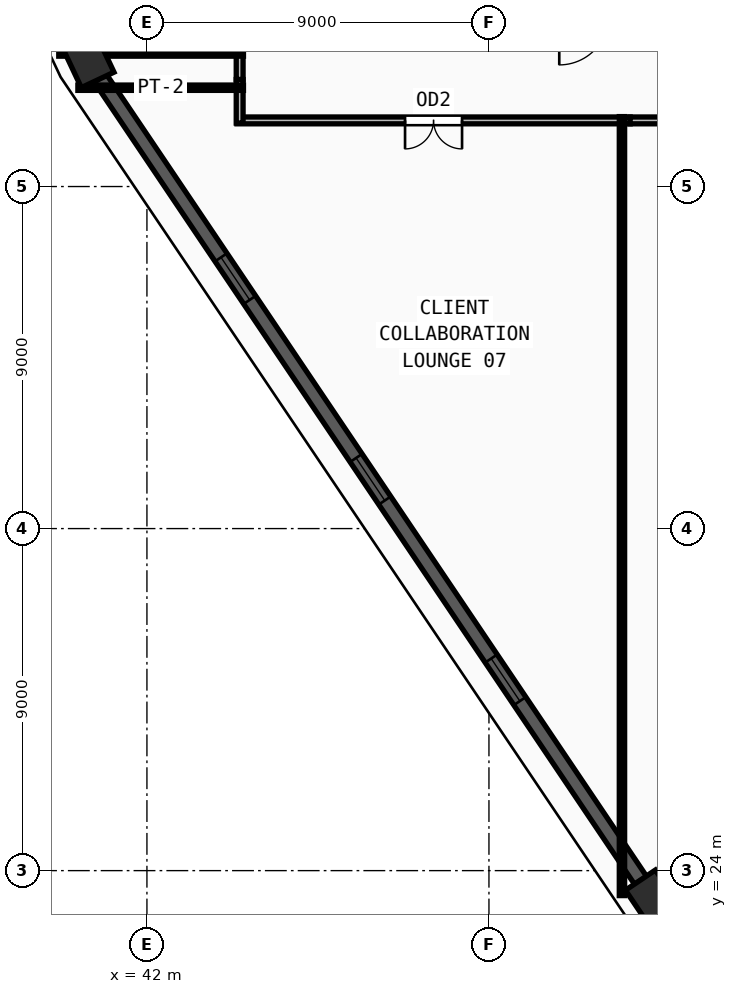
"""IFC4 building model, lengths in metres.
Left out: names, types, materials, properties, quantities, classifications, styles, units other than length and angle.
Written with IfcOpenShell. Run it as: python <this file> out.ifc"""

import sys

from ifc_helpers import new_model, si_unit, direction, frame, frame_2d, origin, origin_2d, place, context, subcontext, project, spatial, rectangle, extrude, source, transform, mapped, element, fill, save


model = new_model("IFC4")
c1 = context("Model", 3, precision=1e-05, world=origin(), true_north=direction((0.0, 1.0)))
c2 = subcontext(c1, "Body", "Model", "MODEL_VIEW")
j1 = project(units=[si_unit("LENGTHUNIT", "METRE"), si_unit("PLANEANGLEUNIT", "RADIAN")], contexts=[c1])
p1 = place(None, origin())
s1 = spatial("IfcSite", under=j1, at=p1, CompositionType="ELEMENT")
p2 = place(p1, origin())
s2 = spatial("IfcBuilding", under=s1, at=p2, CompositionType="ELEMENT")
p3 = place(p2, frame((0.0, 0.0, 339.75)))
s3 = spatial("IfcBuildingStorey", under=s2, at=p3, CompositionType="ELEMENT", Elevation=339.75)
m1 = source(origin(), c2, "Body", "SweptSolid", [
    extrude(rectangle(XDim=1.1, YDim=0.95, at=origin_2d()), origin(), (0.0, 0.0, 1.0), 3.75),
])
for number, where, z_axis, x_axis in (
    (1, (55.293, 23.294, 0.0), (0.0, 0.0, 1.0), (-0.559, 0.829, 0.0)),
    (2, (40.469, 45.303, 0.0), (0.0, 0.0, 1.0), (-0.427, 0.904, 0.0)),
):
    element("IfcColumn", number, at=place(p3, frame(where, z_axis=z_axis, x_axis=x_axis)), inside=s3, PredefinedType="COLUMN", context=c2, shape_type="MappedRepresentation", body=[
        mapped(m1, transform((0.0, 0.0, 0.0), x_axis=(1.0, 0.0, 0.0), y_axis=(0.0, 1.0, 0.0), z_axis=(0.0, 0.0, 1.0), scale=1.0)),
    ])
p4 = place(p3, frame((40.771, 44.855, 0.0), z_axis=(0.0, 0.0, 1.0), x_axis=(0.558627041585, -0.82941897037, 0.0)))
e3 = element("IfcWall", 3, at=p4, inside=s3, PredefinedType="SOLIDWALL", context=c2, shape_type="SweptSolid", body=[
    extrude(rectangle(XDim=25.455, YDim=0.38, at=frame_2d((12.728, 0.0))), origin(), (0.0, 0.0, 1.0), 3.57),
])
m2 = source(origin(), c2, "Body", "SweptSolid", [
    extrude(rectangle(XDim=1.35, YDim=1.85, at=frame_2d((0.675, 0.925))), frame((0.0, 0.2, 0.0), z_axis=(0.0, -1.0, 0.0), x_axis=(1.0, 0.0, 0.0)), (0.0, 0.0, 1.0), 0.4),
])
p5 = place(p4, frame((5.689, 0.0, 0.55)))
e4 = element("IfcOpeningElement", 4, at=p5, cuts=e3, PredefinedType="OPENING", context=c2, shape_type="MappedRepresentation", body=[
    mapped(m2, transform((0.0, 0.0, 0.0), x_axis=(1.0, 0.0, 0.0), y_axis=(0.0, 1.0, 0.0), z_axis=(0.0, 0.0, 1.0), scale=1.0)),
])
p6 = place(p4, frame((12.053, 0.0, 0.55)))
e5 = element("IfcOpeningElement", 5, at=p6, cuts=e3, PredefinedType="OPENING", context=c2, shape_type="MappedRepresentation", body=[
    mapped(m2, transform((0.0, 0.0, 0.0), x_axis=(1.0, 0.0, 0.0), y_axis=(0.0, 1.0, 0.0), z_axis=(0.0, 0.0, 1.0), scale=1.0)),
])
p7 = place(p4, frame((18.416, 0.0, 0.55)))
e6 = element("IfcOpeningElement", 6, at=p7, cuts=e3, PredefinedType="OPENING", context=c2, shape_type="MappedRepresentation", body=[
    mapped(m2, transform((0.0, 0.0, 0.0), x_axis=(1.0, 0.0, 0.0), y_axis=(0.0, 1.0, 0.0), z_axis=(0.0, 0.0, 1.0), scale=1.0)),
])
p8 = place(p3, frame((44.44, 44.815, 0.0), z_axis=(0.0, 0.0, 1.0), x_axis=(0.0, 1.0, 0.0)))
e7 = element("IfcWall", 7, at=p8, inside=s3, PredefinedType="PARTITIONING", context=c2, shape_type="SweptSolid", body=[
    extrude(rectangle(XDim=9.47, YDim=0.18, at=frame_2d((4.735, 0.0))), origin(), (0.0, 0.0, 1.0), 3.57),
])
m3 = source(origin(), c2, "Body", "SweptSolid", [
    extrude(rectangle(XDim=1.0, YDim=2.2, at=frame_2d((0.5, 1.1))), frame((0.0, 0.1, 0.0), z_axis=(0.0, -1.0, 0.0), x_axis=(1.0, 0.0, 0.0)), (0.0, 0.0, 1.0), 0.2),
])
p9 = place(p8, frame((4.47, 0.0, 0.0)))
e8 = element("IfcOpeningElement", 8, at=p9, cuts=e7, PredefinedType="OPENING", context=c2, shape_type="MappedRepresentation", body=[
    mapped(m3, transform((0.0, 0.0, 0.0), x_axis=(1.0, 0.0, 0.0), y_axis=(0.0, 1.0, 0.0), z_axis=(0.0, 0.0, 1.0), scale=1.0)),
])
p10 = place(p3, frame((54.715, 43.74, 0.0), z_axis=(0.0, 0.0, 1.0), x_axis=(-1.0, 0.0, 0.0)))
e9 = element("IfcWall", 9, at=p10, inside=s3, PredefinedType="PARTITIONING", context=c2, shape_type="SweptSolid", body=[
    extrude(rectangle(XDim=10.345, YDim=0.18, at=frame_2d((5.172, 0.0))), origin(), (0.0, 0.0, 1.0), 3.57),
])
m4 = source(origin(), c2, "Body", "SweptSolid", [
    extrude(rectangle(XDim=1.5, YDim=2.2, at=frame_2d((0.75, 1.1))), frame((0.0, 0.1, 0.0), z_axis=(0.0, -1.0, 0.0), x_axis=(1.0, 0.0, 0.0)), (0.0, 0.0, 1.0), 0.2),
])
p11 = place(p10, frame((4.423, 0.0, 0.0)))
e10 = element("IfcOpeningElement", 10, at=p11, cuts=e9, PredefinedType="OPENING", context=c2, shape_type="MappedRepresentation", body=[
    mapped(m4, transform((0.0, 0.0, 0.0), x_axis=(1.0, 0.0, 0.0), y_axis=(0.0, 1.0, 0.0), z_axis=(0.0, 0.0, 1.0), scale=1.0)),
])
p12 = place(p3, frame((75.63, 43.74, 0.0), z_axis=(0.0, 0.0, 1.0), x_axis=(-1.0, 0.0, 0.0)))
e11 = element("IfcWall", 11, at=p12, inside=s3, PredefinedType="PARTITIONING", context=c2, shape_type="SweptSolid", body=[
    extrude(rectangle(XDim=20.915, YDim=0.18, at=frame_2d((10.458, 0.0))), origin(), (0.0, 0.0, 1.0), 3.57),
])
p13 = place(p12, frame((9.707, 0.0, 0.0)))
e12 = element("IfcOpeningElement", 12, at=p13, cuts=e11, PredefinedType="OPENING", context=c2, shape_type="MappedRepresentation", body=[
    mapped(m4, transform((0.0, 0.0, 0.0), x_axis=(1.0, 0.0, 0.0), y_axis=(0.0, 1.0, 0.0), z_axis=(0.0, 0.0, 1.0), scale=1.0)),
])
p14 = place(p3, frame((44.44, 43.67, 0.0), z_axis=(0.0, 0.0, 1.0), x_axis=(0.0, 1.0, 0.0)))
e13 = element("IfcWall", 13, at=p14, inside=s3, PredefinedType="PARTITIONING", context=c2, shape_type="SweptSolid", body=[
    extrude(rectangle(XDim=1.145, YDim=0.18, at=frame_2d((0.573, 0.0))), origin(), (0.0, 0.0, 1.0), 3.57),
])
p15 = place(p3, frame((44.54, 44.6, 0.0), z_axis=(0.0, 0.0, 1.0), x_axis=(-1.0, 0.0, 0.0)))
e14 = element("IfcWall", 14, at=p15, inside=s3, PredefinedType="PARTITIONING", context=c2, shape_type="SweptSolid", body=[
    extrude(rectangle(XDim=4.357, YDim=0.14, at=frame_2d((2.178, 0.0))), origin(), (0.0, 0.0, 1.0), 3.57),
])
p16 = place(p3, frame((44.54, 45.5, 0.0), z_axis=(0.0, 0.0, 1.0), x_axis=(-1.0, 0.0, 0.0)))
e15 = element("IfcWall", 15, at=p16, inside=s3, PredefinedType="PARTITIONING", context=c2, shape_type="SweptSolid", body=[
    extrude(rectangle(XDim=4.86, YDim=0.14, at=frame_2d((2.43, 0.0))), origin(), (0.0, 0.0, 1.0), 3.57),
])
p17 = place(p3, frame((54.5, 43.84, 0.0), z_axis=(0.0, 0.0, 1.0), x_axis=(0.0, -1.0, 0.0)))
e16 = element("IfcWall", 16, at=p17, inside=s3, PredefinedType="PARTITIONING", context=c2, shape_type="SweptSolid", body=[
    extrude(rectangle(XDim=20.497, YDim=0.14, at=frame_2d((10.249, 0.0))), origin(), (0.0, 0.0, 1.0), 2.967),
])
m5 = source(origin(), c2, "Body", "SweptSolid", [
    extrude(rectangle(XDim=1.35, YDim=1.85, at=frame_2d((0.675, 0.925))), frame((0.0, 0.03, 0.0), z_axis=(0.0, -1.0, 0.0), x_axis=(1.0, 0.0, 0.0)), (0.0, 0.0, 1.0), 0.06),
])
p18 = place(p5, origin())
e17 = element("IfcWindow", 17, at=p18, inside=s3, PartitioningType="SINGLE_PANEL", PredefinedType="WINDOW", context=c2, shape_type="MappedRepresentation", body=[
    mapped(m5, transform((0.0, 0.0, 0.0), x_axis=(1.0, 0.0, 0.0), y_axis=(0.0, 1.0, 0.0), z_axis=(0.0, 0.0, 1.0), scale=1.0)),
])
fill(e4, e17)
p19 = place(p6, origin())
e18 = element("IfcWindow", 18, at=p19, inside=s3, PartitioningType="SINGLE_PANEL", PredefinedType="WINDOW", context=c2, shape_type="MappedRepresentation", body=[
    mapped(m5, transform((0.0, 0.0, 0.0), x_axis=(1.0, 0.0, 0.0), y_axis=(0.0, 1.0, 0.0), z_axis=(0.0, 0.0, 1.0), scale=1.0)),
])
fill(e5, e18)
p20 = place(p7, origin())
e19 = element("IfcWindow", 19, at=p20, inside=s3, PartitioningType="SINGLE_PANEL", PredefinedType="WINDOW", context=c2, shape_type="MappedRepresentation", body=[
    mapped(m5, transform((0.0, 0.0, 0.0), x_axis=(1.0, 0.0, 0.0), y_axis=(0.0, 1.0, 0.0), z_axis=(0.0, 0.0, 1.0), scale=1.0)),
])
fill(e6, e19)
m6 = source(origin(), c2, "Body", "SweptSolid", [
    extrude(rectangle(XDim=1.5, YDim=2.2, at=frame_2d((0.75, 1.1))), frame((0.0, 0.025, 0.0), z_axis=(0.0, -1.0, 0.0), x_axis=(1.0, 0.0, 0.0)), (0.0, 0.0, 1.0), 0.05),
])
p21 = place(p11, origin())
e20 = element("IfcDoor", 20, at=p21, inside=s3, OperationType="DOUBLE_DOOR_SINGLE_SWING", PredefinedType="DOOR", context=c2, shape_type="MappedRepresentation", body=[
    mapped(m6, transform((0.0, 0.0, 0.0), x_axis=(1.0, 0.0, 0.0), y_axis=(0.0, 1.0, 0.0), z_axis=(0.0, 0.0, 1.0), scale=1.0)),
])
fill(e10, e20)
save(model, sys.argv[1])
